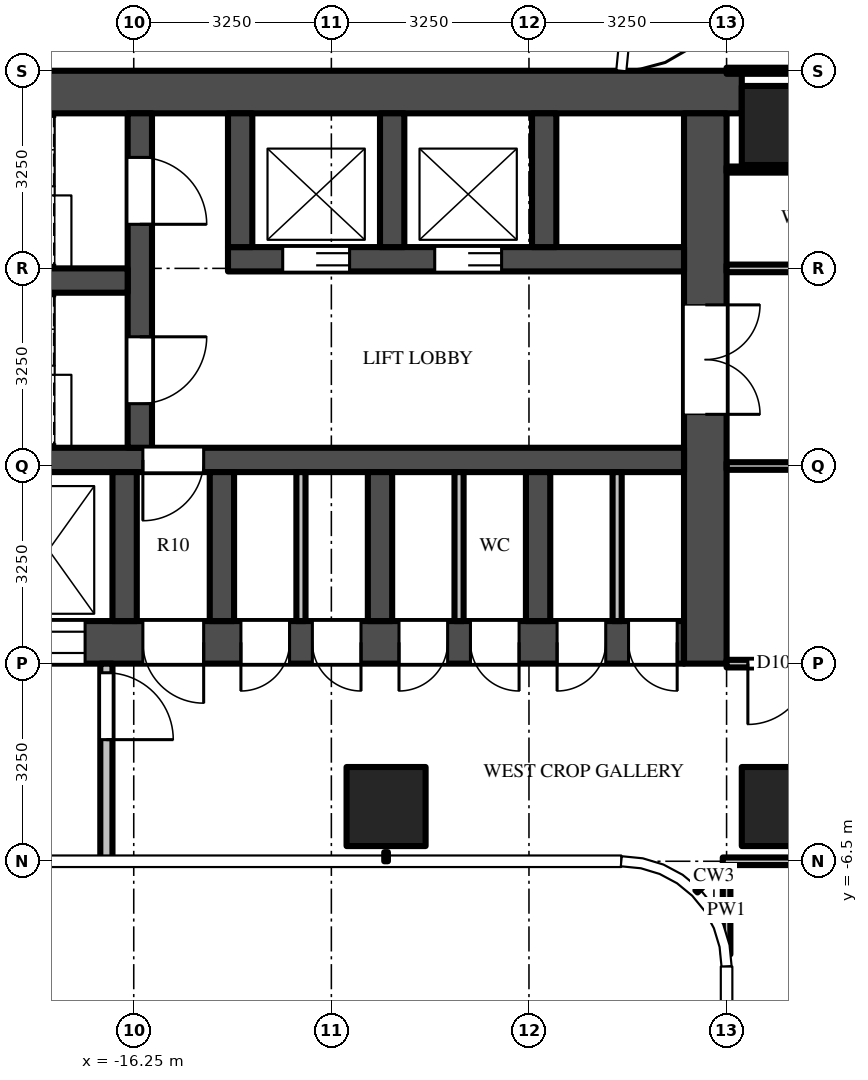
"""IFC4 building model, lengths in metres.
Left out: names, types, materials, properties, quantities, classifications, styles, units other than length and angle.
Written with IfcOpenShell. Run it as: python <this file> out.ifc"""

import sys

from ifc_helpers import new_model, si_unit, direction, frame, frame_2d, origin, origin_2d, place, context, subcontext, project, spatial, polyline, rectangle, outline, extrude, source, transform, mapped, element, fill, save


model = new_model("IFC4")
c1 = context("Model", 3, precision=1e-05, world=origin(), true_north=direction((0.0, 1.0)))
c2 = subcontext(c1, "Body", "Model", "MODEL_VIEW")
j1 = project(units=[si_unit("LENGTHUNIT", "METRE"), si_unit("PLANEANGLEUNIT", "RADIAN")], contexts=[c1])
p1 = place(None, origin())
s1 = spatial("IfcSite", under=j1, at=p1, CompositionType="ELEMENT")
p2 = place(p1, origin())
s2 = spatial("IfcBuilding", under=s1, at=p2, CompositionType="ELEMENT")
p3 = place(p2, frame((0.0, 0.0, 111.0)))
s3 = spatial("IfcBuildingStorey", under=s2, at=p3, CompositionType="ELEMENT", Elevation=111.0)
m1 = source(origin(), c2, "Body", "SweptSolid", [
    extrude(rectangle(XDim=1.3, YDim=1.3, at=origin_2d()), origin(), (0.0, 0.0, 1.0), 4.5),
])
for number, where, z_axis, x_axis in (
    (1, (-5.6, 5.6, 0.0), (0.0, 0.0, 1.0), (1.0, 0.0, 0.0)),
    (2, (-5.6, -5.6, 0.0), (0.0, 0.0, 1.0), (1.0, 0.0, 0.0)),
    (3, (-12.1, -5.6, 0.0), (0.0, 0.0, 1.0), (1.0, 0.0, 0.0)),
):
    element("IfcColumn", number, at=place(p3, frame(where, z_axis=z_axis, x_axis=x_axis)), inside=s3, PredefinedType="COLUMN", context=c2, shape_type="MappedRepresentation", body=[
        mapped(m1, transform((0.0, 0.0, 0.0))),
    ])
m2 = source(origin(), c2, "Body", "SweptSolid", [
    extrude(rectangle(XDim=16.5, YDim=0.7, at=frame_2d((8.25, 0.0))), origin(), (0.0, 0.0, 1.0), 4.25),
])
p4 = place(p3, frame((-6.25, 6.15, 0.0), z_axis=(0.0, 0.0, 1.0), x_axis=(-1.0, 0.0, 0.0)))
e4 = element("IfcWall", 4, at=p4, inside=s3, PredefinedType="SHEAR", context=c2, shape_type="MappedRepresentation", body=[
    mapped(m2, transform((0.0, 0.0, 0.0))),
])
m3 = source(origin(), c2, "Body", "SweptSolid", [
    extrude(rectangle(XDim=14.85, YDim=0.7, at=frame_2d((7.425, 0.0))), origin(), (0.0, 0.0, 1.0), 4.25),
])
p5 = place(p3, frame((-7.2, -2.9, 0.0), z_axis=(0.0, 0.0, 1.0), x_axis=(-1.0, 0.0, 0.0)))
e5 = element("IfcWall", 5, at=p5, inside=s3, PredefinedType="SHEAR", context=c2, shape_type="MappedRepresentation", body=[
    mapped(m3, transform((0.0, 0.0, 0.0))),
])
m4 = source(origin(), c2, "Body", "SweptSolid", [
    extrude(rectangle(XDim=1.3, YDim=2.1, at=frame_2d((0.65, 1.05))), frame((0.0, 0.36, 0.0), z_axis=(0.0, -1.0, 0.0), x_axis=(1.0, 0.0, 0.0)), (0.0, 0.0, 1.0), 0.72),
])
p6 = place(p5, frame((12.2, 0.0, 0.0)))
e6 = element("IfcOpeningElement", 6, at=p6, cuts=e5, PredefinedType="OPENING", context=c2, shape_type="MappedRepresentation", body=[
    mapped(m4, transform((0.0, 0.0, 0.0))),
])
m5 = source(origin(), c2, "Body", "SweptSolid", [
    extrude(rectangle(XDim=1.2, YDim=2.1, at=frame_2d((0.6, 1.05))), frame((0.0, 0.36, 0.0), z_axis=(0.0, -1.0, 0.0), x_axis=(1.0, 0.0, 0.0)), (0.0, 0.0, 1.0), 0.72),
])
p7 = place(p5, frame((9.85, 0.0, 0.0)))
e7 = element("IfcOpeningElement", 7, at=p7, cuts=e5, PredefinedType="OPENING", context=c2, shape_type="MappedRepresentation", body=[
    mapped(m5, transform((0.0, 0.0, 0.0))),
])
m6 = source(origin(), c2, "Body", "SweptSolid", [
    extrude(rectangle(XDim=1.0, YDim=2.1, at=frame_2d((0.5, 1.05))), frame((0.0, 0.36, 0.0), z_axis=(0.0, -1.0, 0.0), x_axis=(1.0, 0.0, 0.0)), (0.0, 0.0, 1.0), 0.72),
])
p8 = place(p5, frame((7.9, 0.0, 0.0)))
e8 = element("IfcOpeningElement", 8, at=p8, cuts=e5, PredefinedType="OPENING", context=c2, shape_type="MappedRepresentation", body=[
    mapped(m6, transform((0.0, 0.0, 0.0))),
])
m7 = source(origin(), c2, "Body", "SweptSolid", [
    extrude(rectangle(XDim=0.8, YDim=2.1, at=frame_2d((0.4, 1.05))), frame((0.0, 0.36, 0.0), z_axis=(0.0, -1.0, 0.0), x_axis=(1.0, 0.0, 0.0)), (0.0, 0.0, 1.0), 0.72),
])
p9 = place(p5, frame((0.113, 0.0, 0.0)))
e9 = element("IfcOpeningElement", 9, at=p9, cuts=e5, PredefinedType="OPENING", context=c2, shape_type="MappedRepresentation", body=[
    mapped(m7, transform((0.0, 0.0, 0.0))),
])
p10 = place(p5, frame((1.288, 0.0, 0.0)))
e10 = element("IfcOpeningElement", 10, at=p10, cuts=e5, PredefinedType="OPENING", context=c2, shape_type="MappedRepresentation", body=[
    mapped(m7, transform((0.0, 0.0, 0.0))),
])
p11 = place(p5, frame((2.712, 0.0, 0.0)))
e11 = element("IfcOpeningElement", 11, at=p11, cuts=e5, PredefinedType="OPENING", context=c2, shape_type="MappedRepresentation", body=[
    mapped(m7, transform((0.0, 0.0, 0.0))),
])
p12 = place(p5, frame((3.887, 0.0, 0.0)))
e12 = element("IfcOpeningElement", 12, at=p12, cuts=e5, PredefinedType="OPENING", context=c2, shape_type="MappedRepresentation", body=[
    mapped(m7, transform((0.0, 0.0, 0.0))),
])
p13 = place(p5, frame((5.312, 0.0, 0.0)))
e13 = element("IfcOpeningElement", 13, at=p13, cuts=e5, PredefinedType="OPENING", context=c2, shape_type="MappedRepresentation", body=[
    mapped(m7, transform((0.0, 0.0, 0.0))),
])
p14 = place(p5, frame((6.488, 0.0, 0.0)))
e14 = element("IfcOpeningElement", 14, at=p14, cuts=e5, PredefinedType="OPENING", context=c2, shape_type="MappedRepresentation", body=[
    mapped(m7, transform((0.0, 0.0, 0.0))),
])
m8 = source(origin(), c2, "Body", "SweptSolid", [
    extrude(rectangle(XDim=9.05, YDim=0.7, at=frame_2d((4.525, 0.0))), origin(), (0.0, 0.0, 1.0), 4.25),
])
p15 = place(p3, frame((-6.85, 5.8, 0.0), z_axis=(0.0, 0.0, 1.0), x_axis=(0.0, -1.0, 0.0)))
e15 = element("IfcWall", 15, at=p15, inside=s3, PredefinedType="SHEAR", context=c2, shape_type="MappedRepresentation", body=[
    mapped(m8, transform((0.0, 0.0, 0.0))),
])
m9 = source(origin(), c2, "Body", "SweptSolid", [
    extrude(rectangle(XDim=1.8, YDim=2.1, at=frame_2d((0.9, 1.05))), frame((0.0, 0.36, 0.0), z_axis=(0.0, -1.0, 0.0), x_axis=(1.0, 0.0, 0.0)), (0.0, 0.0, 1.0), 0.72),
])
p16 = place(p15, frame((3.15, 0.0, 0.0)))
e16 = element("IfcOpeningElement", 16, at=p16, cuts=e15, PredefinedType="OPENING", context=c2, shape_type="MappedRepresentation", body=[
    mapped(m9, transform((0.0, 0.0, 0.0))),
])
m10 = source(origin(), c2, "Body", "SweptSolid", [
    extrude(rectangle(XDim=7.5, YDim=0.4, at=frame_2d((3.75, 0.0))), origin(), (0.0, 0.0, 1.0), 4.25),
])
p17 = place(p3, frame((-7.2, 3.4, 0.0), z_axis=(0.0, 0.0, 1.0), x_axis=(-1.0, 0.0, 0.0)))
e17 = element("IfcWall", 17, at=p17, inside=s3, PredefinedType="SHEAR", context=c2, shape_type="MappedRepresentation", body=[
    mapped(m10, transform((0.0, 0.0, 0.0))),
])
m11 = source(origin(), c2, "Body", "SweptSolid", [
    extrude(rectangle(XDim=1.1, YDim=2.1, at=frame_2d((0.55, 1.05))), frame((0.0, 0.21, 0.0), z_axis=(0.0, -1.0, 0.0), x_axis=(1.0, 0.0, 0.0)), (0.0, 0.0, 1.0), 0.42),
])
p18 = place(p17, frame((3.0, 0.0, 0.0)))
e18 = element("IfcOpeningElement", 18, at=p18, cuts=e17, PredefinedType="OPENING", context=c2, shape_type="MappedRepresentation", body=[
    mapped(m11, transform((0.0, 0.0, 0.0))),
])
p19 = place(p17, frame((5.5, 0.0, 0.0)))
e19 = element("IfcOpeningElement", 19, at=p19, cuts=e17, PredefinedType="OPENING", context=c2, shape_type="MappedRepresentation", body=[
    mapped(m11, transform((0.0, 0.0, 0.0))),
])
m12 = source(origin(), c2, "Body", "SweptSolid", [
    extrude(rectangle(XDim=14.85, YDim=0.4, at=frame_2d((7.425, 0.0))), origin(), (0.0, 0.0, 1.0), 4.25),
])
p20 = place(p3, frame((-7.2, 0.1, 0.0), z_axis=(0.0, 0.0, 1.0), x_axis=(-1.0, 0.0, 0.0)))
e20 = element("IfcWall", 20, at=p20, inside=s3, PredefinedType="SHEAR", context=c2, shape_type="MappedRepresentation", body=[
    mapped(m12, transform((0.0, 0.0, 0.0))),
])
m13 = source(origin(), c2, "Body", "SweptSolid", [
    extrude(rectangle(XDim=1.0, YDim=2.1, at=frame_2d((0.5, 1.05))), frame((0.0, 0.21, 0.0), z_axis=(0.0, -1.0, 0.0), x_axis=(1.0, 0.0, 0.0)), (0.0, 0.0, 1.0), 0.42),
])
p21 = place(p20, frame((7.9, 0.0, 0.0)))
e21 = element("IfcOpeningElement", 21, at=p21, cuts=e20, PredefinedType="OPENING", context=c2, shape_type="MappedRepresentation", body=[
    mapped(m13, transform((0.0, 0.0, 0.0))),
])
m14 = source(origin(), c2, "Body", "SweptSolid", [
    extrude(rectangle(XDim=5.5, YDim=0.4, at=frame_2d((2.75, 0.0))), origin(), (0.0, 0.0, 1.0), 4.25),
])
p22 = place(p3, frame((-16.15, 5.8, 0.0), z_axis=(0.0, 0.0, 1.0), x_axis=(0.0, -1.0, 0.0)))
e22 = element("IfcWall", 22, at=p22, inside=s3, PredefinedType="SHEAR", context=c2, shape_type="MappedRepresentation", body=[
    mapped(m14, transform((0.0, 0.0, 0.0))),
])
p23 = place(p22, frame((0.725, 0.0, 0.0)))
e23 = element("IfcOpeningElement", 23, at=p23, cuts=e22, PredefinedType="OPENING", context=c2, shape_type="MappedRepresentation", body=[
    mapped(m11, transform((0.0, 0.0, 0.0))),
])
p24 = place(p22, frame((3.675, 0.0, 0.0)))
e24 = element("IfcOpeningElement", 24, at=p24, cuts=e22, PredefinedType="OPENING", context=c2, shape_type="MappedRepresentation", body=[
    mapped(m11, transform((0.0, 0.0, 0.0))),
])
m15 = source(origin(), c2, "Body", "SweptSolid", [
    extrude(rectangle(XDim=5.7, YDim=0.4, at=frame_2d((2.85, 0.0))), origin(), (0.0, 0.0, 1.0), 4.25),
])
p25 = place(p3, frame((-16.35, 3.05, 0.0), z_axis=(0.0, 0.0, 1.0), x_axis=(-1.0, 0.0, 0.0)))
e25 = element("IfcWall", 25, at=p25, inside=s3, PredefinedType="SHEAR", context=c2, shape_type="MappedRepresentation", body=[
    mapped(m15, transform((0.0, 0.0, 0.0))),
])
m16 = source(origin(), c2, "Body", "SweptSolid", [
    extrude(rectangle(XDim=2.2, YDim=0.4, at=frame_2d((1.1, 0.0))), origin(), (0.0, 0.0, 1.0), 4.25),
])
for number, where, z_axis, x_axis in (
    (26, (-9.5, 5.8, 0.0), (0.0, 0.0, 1.0), (0.0, -1.0, 0.0)),
    (27, (-12.0, 5.8, 0.0), (0.0, 0.0, 1.0), (0.0, -1.0, 0.0)),
    (28, (-14.5, 5.8, 0.0), (0.0, 0.0, 1.0), (0.0, -1.0, 0.0)),
):
    element("IfcWall", number, at=place(p3, frame(where, z_axis=z_axis, x_axis=x_axis)), inside=s3, PredefinedType="SHEAR", context=c2, shape_type="MappedRepresentation", body=[
        mapped(m16, transform((0.0, 0.0, 0.0))),
    ])
m17 = source(origin(), c2, "Body", "SweptSolid", [
    extrude(rectangle(XDim=2.45, YDim=0.4, at=frame_2d((1.225, 0.0))), origin(), (0.0, 0.0, 1.0), 4.25),
])
for number, where, z_axis, x_axis in (
    (29, (-9.6, -0.1, 0.0), (0.0, 0.0, 1.0), (0.0, -1.0, 0.0)),
    (30, (-12.2, -0.1, 0.0), (0.0, 0.0, 1.0), (0.0, -1.0, 0.0)),
    (31, (-14.8, -0.1, 0.0), (0.0, 0.0, 1.0), (0.0, -1.0, 0.0)),
    (32, (-16.4, -0.1, 0.0), (0.0, 0.0, 1.0), (0.0, -1.0, 0.0)),
):
    element("IfcWall", number, at=place(p3, frame(where, z_axis=z_axis, x_axis=x_axis)), inside=s3, PredefinedType="SHEAR", context=c2, shape_type="MappedRepresentation", body=[
        mapped(m17, transform((0.0, 0.0, 0.0))),
    ])
m18 = source(origin(), c2, "Body", "SweptSolid", [
    extrude(rectangle(XDim=3.25, YDim=0.2, at=frame_2d((1.625, 0.0))), origin(), (0.0, 0.0, 1.0), 4.25),
])
p26 = place(p3, frame((-16.7, -3.25, 0.0), z_axis=(0.0, 0.0, 1.0), x_axis=(0.0, -1.0, 0.0)))
e33 = element("IfcWall", 33, at=p26, inside=s3, PredefinedType="PARTITIONING", context=c2, shape_type="MappedRepresentation", body=[
    mapped(m18, transform((0.0, 0.0, 0.0))),
])
m19 = source(origin(), c2, "Body", "SweptSolid", [
    extrude(rectangle(XDim=1.1, YDim=2.1, at=frame_2d((0.55, 1.05))), frame((0.0, 0.11, 0.0), z_axis=(0.0, -1.0, 0.0), x_axis=(1.0, 0.0, 0.0)), (0.0, 0.0, 1.0), 0.22),
])
p27 = place(p26, frame((0.15, 0.0, 0.0)))
e34 = element("IfcOpeningElement", 34, at=p27, cuts=e33, PredefinedType="OPENING", context=c2, shape_type="MappedRepresentation", body=[
    mapped(m19, transform((0.0, 0.0, 0.0))),
])
m20 = source(origin(), c2, "Body", "SweptSolid", [
    extrude(rectangle(XDim=2.45, YDim=0.15, at=frame_2d((1.225, 0.0))), origin(), (0.0, 0.0, 1.0), 4.25),
])
for number, where, z_axis, x_axis in (
    (35, (-8.3, -0.1, 0.0), (0.0, 0.0, 1.0), (0.0, -1.0, 0.0)),
    (36, (-10.9, -0.1, 0.0), (0.0, 0.0, 1.0), (0.0, -1.0, 0.0)),
    (37, (-13.5, -0.1, 0.0), (0.0, 0.0, 1.0), (0.0, -1.0, 0.0)),
):
    element("IfcWall", number, at=place(p3, frame(where, z_axis=z_axis, x_axis=x_axis)), inside=s3, PredefinedType="PARTITIONING", context=c2, shape_type="MappedRepresentation", body=[
        mapped(m20, transform((0.0, 0.0, 0.0))),
    ])
p28 = place(p3, origin())
e38 = element("IfcWall", 38, at=p28, inside=s3, PredefinedType="USERDEFINED", context=c2, shape_type="SweptSolid", body=[
    extrude(outline(polyline([(-16.373, -8.885), (-17.268, -8.857), (-18.005, -8.693), (-17.875, -8.107), (-17.193, -8.259), (-16.412, -8.284), (-15.616, -8.155), (-15.497, -8.115), (-15.309, -8.685), (-15.473, -8.739), (-16.373, -8.885)])), origin(), (0.0, 0.0, 1.0), 0.5),
])
m21 = source(origin(), c2, "Body", "SweptSolid", [
    extrude(rectangle(XDim=1.469, YDim=0.125, at=frame_2d((0.734, 0.0))), origin(), (0.0, 0.0, 1.0), 4.25),
])
p29 = place(p3, frame((-6.5, -6.562, 0.0), z_axis=(0.0, 0.0, 1.0), x_axis=(0.0, -1.0, 0.0)))
e39 = element("IfcWall", 39, at=p29, inside=s3, PredefinedType="PARTITIONING", context=c2, shape_type="MappedRepresentation", body=[
    mapped(m21, transform((0.0, 0.0, 0.0))),
])
m22 = source(origin(), c2, "Body", "SweptSolid", [
    extrude(rectangle(XDim=5.425, YDim=0.125, at=frame_2d((2.712, 0.0))), origin(), (0.0, 0.0, 1.0), 3.33),
])
p30 = place(p3, frame((-1.137, -6.5, 0.0), z_axis=(0.0, 0.0, 1.0), x_axis=(-1.0, 0.0, 0.0)))
e40 = element("IfcWall", 40, at=p30, inside=s3, PredefinedType="PARTITIONING", context=c2, shape_type="MappedRepresentation", body=[
    mapped(m22, transform((0.0, 0.0, 0.0))),
])
m23 = source(origin(), c2, "Body", "SweptSolid", [
    extrude(rectangle(XDim=5.363, YDim=0.125, at=frame_2d((2.681, 0.0))), origin(), (0.0, 0.0, 1.0), 3.468),
])
p31 = place(p3, frame((-1.137, -3.25, 0.0), z_axis=(0.0, 0.0, 1.0), x_axis=(-1.0, 0.0, 0.0)))
e41 = element("IfcWall", 41, at=p31, inside=s3, PredefinedType="PARTITIONING", context=c2, shape_type="MappedRepresentation", body=[
    mapped(m23, transform((0.0, 0.0, 0.0))),
])
m24 = source(origin(), c2, "Body", "SweptSolid", [
    extrude(rectangle(XDim=1.0, YDim=2.1, at=frame_2d((0.5, 1.05))), frame((0.0, 0.073, 0.0), z_axis=(0.0, -1.0, 0.0), x_axis=(1.0, 0.0, 0.0)), (0.0, 0.0, 1.0), 0.145),
])
p32 = place(p31, frame((4.012, 0.0, 0.0)))
e42 = element("IfcOpeningElement", 42, at=p32, cuts=e41, PredefinedType="OPENING", context=c2, shape_type="MappedRepresentation", body=[
    mapped(m24, transform((0.0, 0.0, 0.0))),
])
p33 = place(p3, frame((-1.137, 0.0, 0.0), z_axis=(0.0, 0.0, 1.0), x_axis=(-1.0, 0.0, 0.0)))
e43 = element("IfcWall", 43, at=p33, inside=s3, PredefinedType="PARTITIONING", context=c2, shape_type="MappedRepresentation", body=[
    mapped(m23, transform((0.0, 0.0, 0.0))),
])
p34 = place(p3, frame((-6.5, 3.25, 0.0), z_axis=(0.0, 0.0, 1.0), x_axis=(1.0, 0.0, 0.0)))
e44 = element("IfcWall", 44, at=p34, inside=s3, PredefinedType="PARTITIONING", context=c2, shape_type="MappedRepresentation", body=[
    mapped(m23, transform((0.0, 0.0, 0.0))),
])
p35 = place(p34, frame((3.95, 0.0, 0.0)))
e45 = element("IfcOpeningElement", 45, at=p35, cuts=e44, PredefinedType="OPENING", context=c2, shape_type="MappedRepresentation", body=[
    mapped(m24, transform((0.0, 0.0, 0.0))),
])
m25 = source(origin(), c2, "Body", "SweptSolid", [
    extrude(rectangle(XDim=5.238, YDim=0.1, at=frame_2d((2.619, 0.0))), origin(), (0.0, 0.0, 1.0), 3.468),
])
p36 = place(p3, frame((-6.5, 4.875, 0.0), z_axis=(0.0, 0.0, 1.0), x_axis=(1.0, 0.0, 0.0)))
e46 = element("IfcWall", 46, at=p36, inside=s3, PredefinedType="PARTITIONING", context=c2, shape_type="MappedRepresentation", body=[
    mapped(m25, transform((0.0, 0.0, 0.0))),
])
m26 = source(origin(), c2, "Body", "SweptSolid", [
    extrude(rectangle(XDim=5.363, YDim=0.1, at=frame_2d((2.681, 0.0))), origin(), (0.0, 0.0, 1.0), 3.33),
])
p37 = place(p3, frame((-6.5, 6.5, 0.0), z_axis=(0.0, 0.0, 1.0), x_axis=(1.0, 0.0, 0.0)))
e47 = element("IfcWall", 47, at=p37, inside=s3, PredefinedType="PARTITIONING", context=c2, shape_type="MappedRepresentation", body=[
    mapped(m26, transform((0.0, 0.0, 0.0))),
])
m27 = source(origin(), c2, "Body", "SweptSolid", [
    extrude(rectangle(XDim=1.1, YDim=2.1, at=frame_2d((0.55, 1.05))), frame((0.0, 0.025, 0.0), z_axis=(0.0, -1.0, 0.0), x_axis=(1.0, 0.0, 0.0)), (0.0, 0.0, 1.0), 0.05),
])
p38 = place(p18, origin())
e48 = element("IfcDoor", 48, at=p38, inside=s3, OperationType="DOUBLE_DOOR_SLIDING", PredefinedType="DOOR", context=c2, shape_type="MappedRepresentation", body=[
    mapped(m27, transform((0.0, 0.0, 0.0))),
])
fill(e18, e48)
p39 = place(p19, origin())
e49 = element("IfcDoor", 49, at=p39, inside=s3, OperationType="DOUBLE_DOOR_SLIDING", PredefinedType="DOOR", context=c2, shape_type="MappedRepresentation", body=[
    mapped(m27, transform((0.0, 0.0, 0.0))),
])
fill(e19, e49)
m28 = source(origin(), c2, "Body", "SweptSolid", [
    extrude(rectangle(XDim=1.2, YDim=2.1, at=frame_2d((0.6, 1.05))), frame((0.0, -0.275, 0.0), z_axis=(0.0, -1.0, 0.0), x_axis=(1.0, 0.0, 0.0)), (0.0, 0.0, 1.0), 0.05),
])
p40 = place(p7, origin())
e50 = element("IfcDoor", 50, at=p40, inside=s3, OperationType="DOUBLE_DOOR_SLIDING", PredefinedType="DOOR", context=c2, shape_type="MappedRepresentation", body=[
    mapped(m28, transform((0.0, 0.0, 0.0))),
])
fill(e7, e50)
m29 = source(origin(), c2, "Body", "SweptSolid", [
    extrude(rectangle(XDim=1.8, YDim=2.1, at=frame_2d((0.9, 1.05))), frame((0.0, -0.275, 0.0), z_axis=(0.0, -1.0, 0.0), x_axis=(1.0, 0.0, 0.0)), (0.0, 0.0, 1.0), 0.05),
])
p41 = place(p16, origin())
e51 = element("IfcDoor", 51, at=p41, inside=s3, OperationType="DOUBLE_DOOR_SINGLE_SWING", PredefinedType="DOOR", context=c2, shape_type="MappedRepresentation", body=[
    mapped(m29, transform((0.0, 0.0, 0.0))),
])
fill(e16, e51)
p42 = place(p23, origin())
e52 = element("IfcDoor", 52, at=p42, inside=s3, OperationType="SINGLE_SWING_RIGHT", PredefinedType="DOOR", context=c2, shape_type="MappedRepresentation", body=[
    mapped(m27, transform((0.0, 0.0, 0.0))),
])
fill(e23, e52)
p43 = place(p24, origin())
e53 = element("IfcDoor", 53, at=p43, inside=s3, OperationType="SINGLE_SWING_LEFT", PredefinedType="DOOR", context=c2, shape_type="MappedRepresentation", body=[
    mapped(m27, transform((0.0, 0.0, 0.0))),
])
fill(e24, e53)
m30 = source(origin(), c2, "Body", "SweptSolid", [
    extrude(rectangle(XDim=1.0, YDim=2.1, at=frame_2d((0.5, 1.05))), frame((0.0, 0.025, 0.0), z_axis=(0.0, -1.0, 0.0), x_axis=(1.0, 0.0, 0.0)), (0.0, 0.0, 1.0), 0.05),
])
p44 = place(p21, origin())
e54 = element("IfcDoor", 54, at=p44, inside=s3, OperationType="SINGLE_SWING_RIGHT", PredefinedType="DOOR", context=c2, shape_type="MappedRepresentation", body=[
    mapped(m30, transform((0.0, 0.0, 0.0))),
])
fill(e21, e54)
m31 = source(origin(), c2, "Body", "SweptSolid", [
    extrude(rectangle(XDim=1.0, YDim=2.1, at=frame_2d((0.5, 1.05))), frame((0.0, -0.275, 0.0), z_axis=(0.0, -1.0, 0.0), x_axis=(1.0, 0.0, 0.0)), (0.0, 0.0, 1.0), 0.05),
])
p45 = place(p8, origin())
e55 = element("IfcDoor", 55, at=p45, inside=s3, OperationType="SINGLE_SWING_LEFT", PredefinedType="DOOR", context=c2, shape_type="MappedRepresentation", body=[
    mapped(m31, transform((0.0, 0.0, 0.0))),
])
fill(e8, e55)
p46 = place(p27, origin())
e56 = element("IfcDoor", 56, at=p46, inside=s3, OperationType="SINGLE_SWING_RIGHT", PredefinedType="DOOR", context=c2, shape_type="MappedRepresentation", body=[
    mapped(m27, transform((0.0, 0.0, 0.0))),
])
fill(e34, e56)
m32 = source(origin(), c2, "Body", "SweptSolid", [
    extrude(rectangle(XDim=0.8, YDim=2.1, at=frame_2d((0.4, 1.05))), frame((0.0, -0.275, 0.0), z_axis=(0.0, -1.0, 0.0), x_axis=(1.0, 0.0, 0.0)), (0.0, 0.0, 1.0), 0.05),
])
p47 = place(p9, origin())
e57 = element("IfcDoor", 57, at=p47, inside=s3, OperationType="SINGLE_SWING_LEFT", PredefinedType="DOOR", context=c2, shape_type="MappedRepresentation", body=[
    mapped(m32, transform((0.0, 0.0, 0.0))),
])
fill(e9, e57)
p48 = place(p10, origin())
e58 = element("IfcDoor", 58, at=p48, inside=s3, OperationType="SINGLE_SWING_RIGHT", PredefinedType="DOOR", context=c2, shape_type="MappedRepresentation", body=[
    mapped(m32, transform((0.0, 0.0, 0.0))),
])
fill(e10, e58)
p49 = place(p11, origin())
e59 = element("IfcDoor", 59, at=p49, inside=s3, OperationType="SINGLE_SWING_LEFT", PredefinedType="DOOR", context=c2, shape_type="MappedRepresentation", body=[
    mapped(m32, transform((0.0, 0.0, 0.0))),
])
fill(e11, e59)
p50 = place(p12, origin())
e60 = element("IfcDoor", 60, at=p50, inside=s3, OperationType="SINGLE_SWING_RIGHT", PredefinedType="DOOR", context=c2, shape_type="MappedRepresentation", body=[
    mapped(m32, transform((0.0, 0.0, 0.0))),
])
fill(e12, e60)
p51 = place(p13, origin())
e61 = element("IfcDoor", 61, at=p51, inside=s3, OperationType="SINGLE_SWING_LEFT", PredefinedType="DOOR", context=c2, shape_type="MappedRepresentation", body=[
    mapped(m32, transform((0.0, 0.0, 0.0))),
])
fill(e13, e61)
p52 = place(p14, origin())
e62 = element("IfcDoor", 62, at=p52, inside=s3, OperationType="SINGLE_SWING_RIGHT", PredefinedType="DOOR", context=c2, shape_type="MappedRepresentation", body=[
    mapped(m32, transform((0.0, 0.0, 0.0))),
])
fill(e14, e62)
p53 = place(p32, origin())
e63 = element("IfcDoor", 63, at=p53, inside=s3, OperationType="SINGLE_SWING_RIGHT", PredefinedType="DOOR", context=c2, shape_type="MappedRepresentation", body=[
    mapped(m30, transform((0.0, 0.0, 0.0))),
])
fill(e42, e63)
save(model, sys.argv[1])
